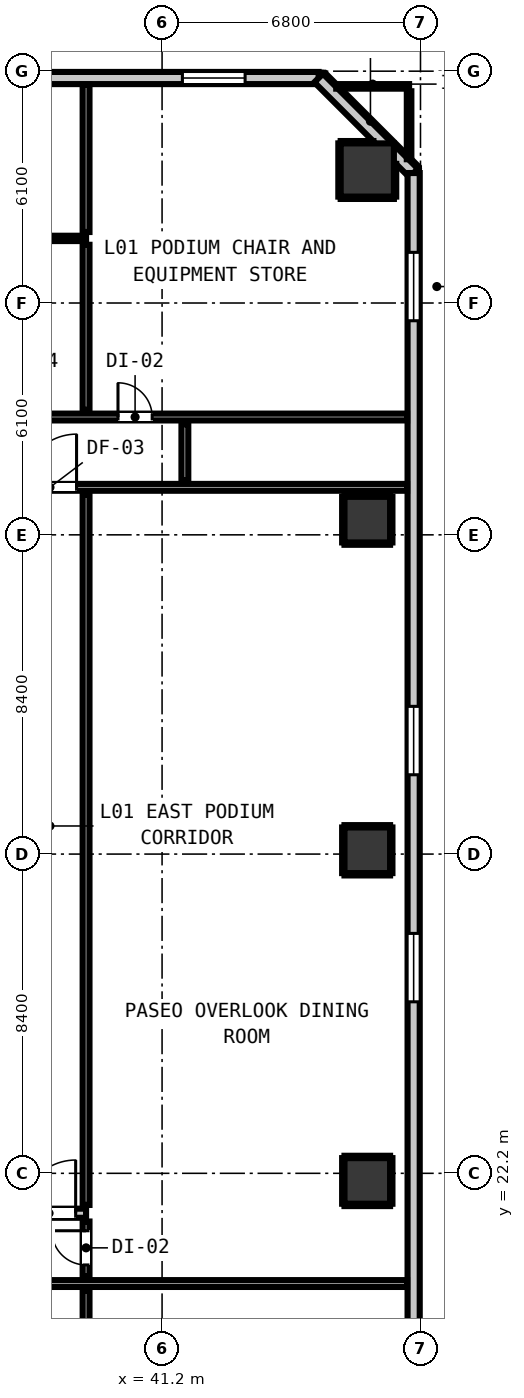
"""IFC4 building model, lengths in metres.
Left out: names, types, materials, properties, quantities, classifications, styles, units other than length and angle.
Written with IfcOpenShell. Run it as: python <this file> out.ifc"""

import sys

from ifc_helpers import new_model, si_unit, direction, frame, frame_2d, origin, origin_2d, place, context, subcontext, project, spatial, rectangle, circle, extrude, element, fill, save


model = new_model("IFC4")
c1 = context("Model", 3, precision=1e-05, world=origin(), true_north=direction((0.0, 1.0)))
c2 = subcontext(c1, "Body", "Model", "MODEL_VIEW")
j1 = project(units=[si_unit("LENGTHUNIT", "METRE"), si_unit("PLANEANGLEUNIT", "RADIAN")], contexts=[c1])
p1 = place(None, origin())
s1 = spatial("IfcSite", under=j1, at=p1, CompositionType="ELEMENT")
p2 = place(p1, origin())
s2 = spatial("IfcBuilding", under=s1, at=p2, CompositionType="ELEMENT")
p3 = place(p2, frame((0.0, 0.0, 5.2)))
s3 = spatial("IfcBuildingStorey", under=s2, at=p3, CompositionType="ELEMENT", Elevation=5.2)
for number, where, z_axis, x_axis in (
    (1, (46.6, 22.0, 0.0), (0.0, 0.0, 1.0), (1.0, 0.0, 0.0)),
    (2, (46.6, 30.7, 0.0), (0.0, 0.0, 1.0), (1.0, 0.0, 0.0)),
    (3, (46.6, 39.4, 0.0), (0.0, 0.0, 1.0), (1.0, 0.0, 0.0)),
):
    element("IfcColumn", number, at=place(p3, frame(where, z_axis=z_axis, x_axis=x_axis)), inside=s3, PredefinedType="COLUMN", context=c2, shape_type="SweptSolid", body=[
        extrude(circle(Radius=0.6, at=origin_2d()), origin(), (0.0, 0.0, 1.0), 4.2),
    ])
p4 = place(p3, frame((46.6, 48.6, 0.0), z_axis=(0.0, 0.0, 1.0), x_axis=(1.0, 0.0, 0.0)))
e4 = element("IfcColumn", 4, at=p4, inside=s3, PredefinedType="COLUMN", context=c2, shape_type="SweptSolid", body=[
    extrude(rectangle(XDim=1.4, YDim=1.4, at=origin_2d()), origin(), (0.0, 0.0, 1.0), 4.2),
])
p5 = place(p3, frame((6.68, 51.02, 0.0), z_axis=(0.0, 0.0, 1.0), x_axis=(1.0, 0.0, 0.0)))
e5 = element("IfcWall", 5, at=p5, inside=s3, PredefinedType="STANDARD", context=c2, shape_type="SweptSolid", body=[
    extrude(rectangle(XDim=38.64, YDim=0.32, at=frame_2d((19.32, 0.0))), origin(), (0.0, 0.0, 1.0), 3.92),
])
p6 = place(p5, frame((18.495, 0.0, 0.9)))
e6 = element("IfcOpeningElement", 6, at=p6, cuts=e5, PredefinedType="OPENING", context=c2, shape_type="SweptSolid", body=[
    extrude(rectangle(XDim=1.65, YDim=1.75, at=frame_2d((0.825, 0.875))), frame((0.0, 0.17, 0.0), z_axis=(0.0, -1.0, 0.0), x_axis=(1.0, 0.0, 0.0)), (0.0, 0.0, 1.0), 0.34),
])
p7 = place(p5, frame((24.015, 0.0, 0.9)))
e7 = element("IfcOpeningElement", 7, at=p7, cuts=e5, PredefinedType="OPENING", context=c2, shape_type="SweptSolid", body=[
    extrude(rectangle(XDim=1.65, YDim=1.75, at=frame_2d((0.825, 0.875))), frame((0.0, 0.17, 0.0), z_axis=(0.0, -1.0, 0.0), x_axis=(1.0, 0.0, 0.0)), (0.0, 0.0, 1.0), 0.34),
])
p8 = place(p5, frame((35.055, 0.0, 0.9)))
e8 = element("IfcOpeningElement", 8, at=p8, cuts=e5, PredefinedType="OPENING", context=c2, shape_type="SweptSolid", body=[
    extrude(rectangle(XDim=1.65, YDim=1.75, at=frame_2d((0.825, 0.875))), frame((0.0, 0.17, 0.0), z_axis=(0.0, -1.0, 0.0), x_axis=(1.0, 0.0, 0.0)), (0.0, 0.0, 1.0), 0.34),
])
p9 = place(p3, frame((45.32, 51.02, 0.0), z_axis=(0.0, 0.0, 1.0), x_axis=(0.707106781187, -0.707106781187, 0.0)))
e9 = element("IfcWall", 9, at=p9, inside=s3, PredefinedType="STANDARD", context=c2, shape_type="SweptSolid", body=[
    extrude(rectangle(XDim=3.536, YDim=0.32, at=frame_2d((1.768, 0.0))), origin(), (0.0, 0.0, 1.0), 3.92),
])
p10 = place(p3, frame((47.82, 48.52, 0.0), z_axis=(0.0, 0.0, 1.0), x_axis=(0.0, -1.0, 0.0)))
e10 = element("IfcWall", 10, at=p10, inside=s3, PredefinedType="STANDARD", context=c2, shape_type="SweptSolid", body=[
    extrude(rectangle(XDim=35.84, YDim=0.32, at=frame_2d((17.92, 0.0))), origin(), (0.0, 0.0, 1.0), 3.92),
])
p11 = place(p10, frame((2.087, 0.0, 0.9)))
e11 = element("IfcOpeningElement", 11, at=p11, cuts=e10, PredefinedType="OPENING", context=c2, shape_type="SweptSolid", body=[
    extrude(rectangle(XDim=1.8, YDim=1.9, at=frame_2d((0.9, 0.95))), frame((0.0, 0.17, 0.0), z_axis=(0.0, -1.0, 0.0), x_axis=(1.0, 0.0, 0.0)), (0.0, 0.0, 1.0), 0.34),
])
p12 = place(p10, frame((14.033, 0.0, 0.9)))
e12 = element("IfcOpeningElement", 12, at=p12, cuts=e10, PredefinedType="OPENING", context=c2, shape_type="SweptSolid", body=[
    extrude(rectangle(XDim=1.8, YDim=1.9, at=frame_2d((0.9, 0.95))), frame((0.0, 0.17, 0.0), z_axis=(0.0, -1.0, 0.0), x_axis=(1.0, 0.0, 0.0)), (0.0, 0.0, 1.0), 0.34),
])
p13 = place(p10, frame((20.007, 0.0, 0.9)))
e13 = element("IfcOpeningElement", 13, at=p13, cuts=e10, PredefinedType="OPENING", context=c2, shape_type="SweptSolid", body=[
    extrude(rectangle(XDim=1.8, YDim=1.9, at=frame_2d((0.9, 0.95))), frame((0.0, 0.17, 0.0), z_axis=(0.0, -1.0, 0.0), x_axis=(1.0, 0.0, 0.0)), (0.0, 0.0, 1.0), 0.34),
])
p14 = place(p10, frame((31.953, 0.0, 0.9)))
e14 = element("IfcOpeningElement", 14, at=p14, cuts=e10, PredefinedType="OPENING", context=c2, shape_type="SweptSolid", body=[
    extrude(rectangle(XDim=1.8, YDim=1.9, at=frame_2d((0.9, 0.95))), frame((0.0, 0.17, 0.0), z_axis=(0.0, -1.0, 0.0), x_axis=(1.0, 0.0, 0.0)), (0.0, 0.0, 1.0), 0.34),
])
p15 = place(p3, frame((10.5, 21.15, 0.0), z_axis=(0.0, 0.0, 1.0), x_axis=(1.0, 0.0, 0.0)))
e15 = element("IfcWall", 15, at=p15, inside=s3, PredefinedType="PARTITIONING", context=c2, shape_type="SweptSolid", body=[
    extrude(rectangle(XDim=28.7, YDim=0.24, at=frame_2d((14.35, 0.0))), origin(), (0.0, 0.0, 1.0), 3.92),
])
p16 = place(p15, frame((7.71, 0.0, 0.0)))
e16 = element("IfcOpeningElement", 16, at=p16, cuts=e15, PredefinedType="OPENING", context=c2, shape_type="SweptSolid", body=[
    extrude(rectangle(XDim=1.1, YDim=2.15, at=frame_2d((0.55, 1.075))), frame((0.0, 0.13, 0.0), z_axis=(0.0, -1.0, 0.0), x_axis=(1.0, 0.0, 0.0)), (0.0, 0.0, 1.0), 0.26),
])
p17 = place(p15, frame((0.324, 0.0, 0.0)))
e17 = element("IfcOpeningElement", 17, at=p17, cuts=e15, PredefinedType="OPENING", context=c2, shape_type="SweptSolid", body=[
    extrude(rectangle(XDim=1.4, YDim=2.15, at=frame_2d((0.7, 1.075))), frame((0.0, 0.13, 0.0), z_axis=(0.0, -1.0, 0.0), x_axis=(1.0, 0.0, 0.0)), (0.0, 0.0, 1.0), 0.26),
])
p18 = place(p15, frame((27.026, 0.0, 0.0)))
e18 = element("IfcOpeningElement", 18, at=p18, cuts=e15, PredefinedType="OPENING", context=c2, shape_type="SweptSolid", body=[
    extrude(rectangle(XDim=1.4, YDim=2.15, at=frame_2d((0.7, 1.075))), frame((0.0, 0.13, 0.0), z_axis=(0.0, -1.0, 0.0), x_axis=(1.0, 0.0, 0.0)), (0.0, 0.0, 1.0), 0.26),
])
p19 = place(p3, frame((4.352, 19.3, 0.0), z_axis=(0.0, 0.0, 1.0), x_axis=(1.0, 0.0, 0.0)))
e19 = element("IfcWall", 19, at=p19, inside=s3, PredefinedType="PARTITIONING", context=c2, shape_type="SweptSolid", body=[
    extrude(rectangle(XDim=43.296, YDim=0.18, at=frame_2d((21.648, 0.0))), origin(), (0.0, 0.0, 1.0), 3.92),
])
p20 = place(p19, frame((12.248, 0.0, 0.0)))
e20 = element("IfcOpeningElement", 20, at=p20, cuts=e19, PredefinedType="OPENING", context=c2, shape_type="SweptSolid", body=[
    extrude(rectangle(XDim=1.0, YDim=2.15, at=frame_2d((0.5, 1.075))), frame((0.0, 0.1, 0.0), z_axis=(0.0, -1.0, 0.0), x_axis=(1.0, 0.0, 0.0)), (0.0, 0.0, 1.0), 0.2),
])
p21 = place(p19, frame((27.998, 0.0, 0.0)))
e21 = element("IfcOpeningElement", 21, at=p21, cuts=e19, PredefinedType="OPENING", context=c2, shape_type="SweptSolid", body=[
    extrude(rectangle(XDim=1.0, YDim=2.15, at=frame_2d((0.5, 1.075))), frame((0.0, 0.1, 0.0), z_axis=(0.0, -1.0, 0.0), x_axis=(1.0, 0.0, 0.0)), (0.0, 0.0, 1.0), 0.2),
])
p22 = place(p3, frame((10.5, 40.25, 0.0), z_axis=(0.0, 0.0, 1.0), x_axis=(1.0, 0.0, 0.0)))
e22 = element("IfcWall", 22, at=p22, inside=s3, PredefinedType="PARTITIONING", context=c2, shape_type="SweptSolid", body=[
    extrude(rectangle(XDim=37.148, YDim=0.18, at=frame_2d((18.574, 0.0))), origin(), (0.0, 0.0, 1.0), 3.92),
])
p23 = place(p22, frame((6.935, 0.0, 0.0)))
e23 = element("IfcOpeningElement", 23, at=p23, cuts=e22, PredefinedType="OPENING", context=c2, shape_type="SweptSolid", body=[
    extrude(rectangle(XDim=1.4, YDim=2.15, at=frame_2d((0.7, 1.075))), frame((0.0, 0.1, 0.0), z_axis=(0.0, -1.0, 0.0), x_axis=(1.0, 0.0, 0.0)), (0.0, 0.0, 1.0), 0.2),
])
p24 = place(p22, frame((0.324, 0.0, 0.0)))
e24 = element("IfcOpeningElement", 24, at=p24, cuts=e22, PredefinedType="OPENING", context=c2, shape_type="SweptSolid", body=[
    extrude(rectangle(XDim=1.4, YDim=2.15, at=frame_2d((0.7, 1.075))), frame((0.0, 0.1, 0.0), z_axis=(0.0, -1.0, 0.0), x_axis=(1.0, 0.0, 0.0)), (0.0, 0.0, 1.0), 0.2),
])
p25 = place(p22, frame((27.05, 0.0, 0.0)))
e25 = element("IfcOpeningElement", 25, at=p25, cuts=e22, PredefinedType="OPENING", context=c2, shape_type="SweptSolid", body=[
    extrude(rectangle(XDim=1.4, YDim=2.15, at=frame_2d((0.7, 1.075))), frame((0.0, 0.1, 0.0), z_axis=(0.0, -1.0, 0.0), x_axis=(1.0, 0.0, 0.0)), (0.0, 0.0, 1.0), 0.2),
])
p26 = place(p3, frame((4.352, 42.1, 0.0), z_axis=(0.0, 0.0, 1.0), x_axis=(1.0, 0.0, 0.0)))
e26 = element("IfcWall", 26, at=p26, inside=s3, PredefinedType="PARTITIONING", context=c2, shape_type="SweptSolid", body=[
    extrude(rectangle(XDim=43.296, YDim=0.18, at=frame_2d((21.648, 0.0))), origin(), (0.0, 0.0, 1.0), 3.92),
])
p27 = place(p26, frame((10.072, 0.0, 0.0)))
e27 = element("IfcOpeningElement", 27, at=p27, cuts=e26, PredefinedType="OPENING", context=c2, shape_type="SweptSolid", body=[
    extrude(rectangle(XDim=0.9, YDim=2.1, at=frame_2d((0.45, 1.05))), frame((0.0, 0.1, 0.0), z_axis=(0.0, -1.0, 0.0), x_axis=(1.0, 0.0, 0.0)), (0.0, 0.0, 1.0), 0.2),
])
p28 = place(p26, frame((18.798, 0.0, 0.0)))
e28 = element("IfcOpeningElement", 28, at=p28, cuts=e26, PredefinedType="OPENING", context=c2, shape_type="SweptSolid", body=[
    extrude(rectangle(XDim=0.9, YDim=2.1, at=frame_2d((0.45, 1.05))), frame((0.0, 0.1, 0.0), z_axis=(0.0, -1.0, 0.0), x_axis=(1.0, 0.0, 0.0)), (0.0, 0.0, 1.0), 0.2),
])
p29 = place(p26, frame((25.118, 0.0, 0.0)))
e29 = element("IfcOpeningElement", 29, at=p29, cuts=e26, PredefinedType="OPENING", context=c2, shape_type="SweptSolid", body=[
    extrude(rectangle(XDim=0.86, YDim=2.02, at=frame_2d((0.43, 1.01))), frame((0.0, 0.1, 0.0), z_axis=(0.0, -1.0, 0.0), x_axis=(1.0, 0.0, 0.0)), (0.0, 0.0, 1.0), 0.2),
])
p30 = place(p26, frame((29.218, 0.0, 0.0)))
e30 = element("IfcOpeningElement", 30, at=p30, cuts=e26, PredefinedType="OPENING", context=c2, shape_type="SweptSolid", body=[
    extrude(rectangle(XDim=0.86, YDim=2.02, at=frame_2d((0.43, 1.01))), frame((0.0, 0.1, 0.0), z_axis=(0.0, -1.0, 0.0), x_axis=(1.0, 0.0, 0.0)), (0.0, 0.0, 1.0), 0.2),
])
p31 = place(p26, frame((32.873, 0.0, 0.0)))
e31 = element("IfcOpeningElement", 31, at=p31, cuts=e26, PredefinedType="OPENING", context=c2, shape_type="SweptSolid", body=[
    extrude(rectangle(XDim=0.95, YDim=2.1, at=frame_2d((0.475, 1.05))), frame((0.0, 0.1, 0.0), z_axis=(0.0, -1.0, 0.0), x_axis=(1.0, 0.0, 0.0)), (0.0, 0.0, 1.0), 0.2),
])
p32 = place(p26, frame((35.688, 0.0, 0.0)))
e32 = element("IfcOpeningElement", 32, at=p32, cuts=e26, PredefinedType="OPENING", context=c2, shape_type="SweptSolid", body=[
    extrude(rectangle(XDim=0.9, YDim=2.1, at=frame_2d((0.45, 1.05))), frame((0.0, 0.1, 0.0), z_axis=(0.0, -1.0, 0.0), x_axis=(1.0, 0.0, 0.0)), (0.0, 0.0, 1.0), 0.2),
])
p33 = place(p3, frame((28.0, 46.8, 0.0), z_axis=(0.0, 0.0, 1.0), x_axis=(1.0, 0.0, 0.0)))
e33 = element("IfcWall", 33, at=p33, inside=s3, PredefinedType="PARTITIONING", context=c2, shape_type="SweptSolid", body=[
    extrude(rectangle(XDim=11.2, YDim=0.14, at=frame_2d((5.6, 0.0))), origin(), (0.0, 0.0, 1.0), 3.92),
])
p34 = place(p3, frame((45.783, 50.8, 0.0), z_axis=(0.0, 0.0, 1.0), x_axis=(1.0, 0.0, 0.0)))
e34 = element("IfcWall", 34, at=p34, inside=s3, PredefinedType="PARTITIONING", context=c2, shape_type="SweptSolid", body=[
    extrude(rectangle(XDim=1.917, YDim=0.12, at=frame_2d((0.958, 0.0))), origin(), (0.0, 0.0, 1.0), 3.92),
])
p35 = place(p3, frame((39.2, 12.258, 0.0), z_axis=(0.0, 0.0, 1.0), x_axis=(0.0, 1.0, 0.0)))
e35 = element("IfcWall", 35, at=p35, inside=s3, PredefinedType="PARTITIONING", context=c2, shape_type="SweptSolid", body=[
    extrude(rectangle(XDim=6.854, YDim=0.18, at=frame_2d((3.427, 0.0))), origin(), (0.0, 0.0, 1.0), 3.92),
])
p36 = place(p3, frame((39.2, 19.488, 0.0), z_axis=(0.0, 0.0, 1.0), x_axis=(0.0, 1.0, 0.0)))
e36 = element("IfcWall", 36, at=p36, inside=s3, PredefinedType="PARTITIONING", context=c2, shape_type="SweptSolid", body=[
    extrude(rectangle(XDim=1.444, YDim=0.18, at=frame_2d((0.722, 0.0))), origin(), (0.0, 0.0, 1.0), 3.92),
])
p37 = place(p36, frame((0.301, 0.0, 0.0)))
e37 = element("IfcOpeningElement", 37, at=p37, cuts=e36, PredefinedType="OPENING", context=c2, shape_type="SweptSolid", body=[
    extrude(rectangle(XDim=0.9, YDim=2.1, at=frame_2d((0.45, 1.05))), frame((0.0, 0.1, 0.0), z_axis=(0.0, -1.0, 0.0), x_axis=(1.0, 0.0, 0.0)), (0.0, 0.0, 1.0), 0.2),
])
p38 = place(p3, frame((39.2, 21.368, 0.0), z_axis=(0.0, 0.0, 1.0), x_axis=(0.0, 1.0, 0.0)))
e38 = element("IfcWall", 38, at=p38, inside=s3, PredefinedType="PARTITIONING", context=c2, shape_type="SweptSolid", body=[
    extrude(rectangle(XDim=18.694, YDim=0.18, at=frame_2d((9.347, 0.0))), origin(), (0.0, 0.0, 1.0), 3.92),
])
p39 = place(p3, frame((39.2, 42.288, 0.0), z_axis=(0.0, 0.0, 1.0), x_axis=(0.0, 1.0, 0.0)))
e39 = element("IfcWall", 39, at=p39, inside=s3, PredefinedType="PARTITIONING", context=c2, shape_type="SweptSolid", body=[
    extrude(rectangle(XDim=4.344, YDim=0.18, at=frame_2d((2.172, 0.0))), origin(), (0.0, 0.0, 1.0), 3.92),
])
p40 = place(p3, frame((39.2, 46.968, 0.0), z_axis=(0.0, 0.0, 1.0), x_axis=(0.0, 1.0, 0.0)))
e40 = element("IfcWall", 40, at=p40, inside=s3, PredefinedType="PARTITIONING", context=c2, shape_type="SweptSolid", body=[
    extrude(rectangle(XDim=3.88, YDim=0.18, at=frame_2d((1.94, 0.0))), origin(), (0.0, 0.0, 1.0), 3.92),
])
p41 = place(p3, frame((41.8, 40.438, 0.0), z_axis=(0.0, 0.0, 1.0), x_axis=(0.0, 1.0, 0.0)))
e41 = element("IfcWall", 41, at=p41, inside=s3, PredefinedType="PARTITIONING", context=c2, shape_type="SweptSolid", body=[
    extrude(rectangle(XDim=1.474, YDim=0.18, at=frame_2d((0.737, 0.0))), origin(), (0.0, 0.0, 1.0), 3.92),
])
p42 = place(p3, frame((47.7, 48.883, 0.0), z_axis=(0.0, 0.0, 1.0), x_axis=(0.0, 1.0, 0.0)))
e42 = element("IfcWall", 42, at=p42, inside=s3, PredefinedType="PARTITIONING", context=c2, shape_type="SweptSolid", body=[
    extrude(rectangle(XDim=1.789, YDim=0.12, at=frame_2d((0.895, 0.0))), origin(), (0.0, 0.0, 1.0), 3.92),
])
for number, where, z_axis, x_axis in (
    (43, (46.0, 21.368, 0.0), (0.0, 0.0, 1.0), (1.0, 0.0, 0.0)),
    (44, (46.0, 22.632, 0.0), (0.0, 0.0, 1.0), (1.0, 0.0, 0.0)),
):
    element("IfcWall", number, at=place(p3, frame(where, z_axis=z_axis, x_axis=x_axis)), inside=s3, PredefinedType="PARTITIONING", context=c2, shape_type="SweptSolid", body=[
        extrude(rectangle(XDim=1.2, YDim=0.06, at=frame_2d((0.6, 0.0))), origin(), (0.0, 0.0, 1.0), 1.45),
    ])
for number, where, z_axis, x_axis in (
    (45, (45.968, 21.4, 0.0), (0.0, 0.0, 1.0), (0.0, 1.0, 0.0)),
    (46, (47.232, 21.4, 0.0), (0.0, 0.0, 1.0), (0.0, 1.0, 0.0)),
):
    element("IfcWall", number, at=place(p3, frame(where, z_axis=z_axis, x_axis=x_axis)), inside=s3, PredefinedType="PARTITIONING", context=c2, shape_type="SweptSolid", body=[
        extrude(rectangle(XDim=1.2, YDim=0.06, at=frame_2d((0.6, 0.0))), origin(), (0.0, 0.0, 1.0), 1.45),
    ])
for number, where, z_axis, x_axis in (
    (47, (46.0, 30.068, 0.0), (0.0, 0.0, 1.0), (1.0, 0.0, 0.0)),
    (48, (46.0, 31.332, 0.0), (0.0, 0.0, 1.0), (1.0, 0.0, 0.0)),
    (49, (45.968, 30.1, 0.0), (0.0, 0.0, 1.0), (0.0, 1.0, 0.0)),
    (50, (47.232, 30.1, 0.0), (0.0, 0.0, 1.0), (0.0, 1.0, 0.0)),
    (51, (46.0, 38.768, 0.0), (0.0, 0.0, 1.0), (1.0, 0.0, 0.0)),
    (52, (46.0, 40.032, 0.0), (0.0, 0.0, 1.0), (1.0, 0.0, 0.0)),
    (53, (45.968, 38.8, 0.0), (0.0, 0.0, 1.0), (0.0, 1.0, 0.0)),
    (54, (47.232, 38.8, 0.0), (0.0, 0.0, 1.0), (0.0, 1.0, 0.0)),
):
    element("IfcWall", number, at=place(p3, frame(where, z_axis=z_axis, x_axis=x_axis)), inside=s3, PredefinedType="PARTITIONING", context=c2, shape_type="SweptSolid", body=[
        extrude(rectangle(XDim=1.2, YDim=0.06, at=frame_2d((0.6, 0.0))), origin(), (0.0, 0.0, 1.0), 1.45),
    ])
p43 = place(p3, frame((45.9, 47.868, 0.0), z_axis=(0.0, 0.0, 1.0), x_axis=(1.0, 0.0, 0.0)))
e55 = element("IfcWall", 55, at=p43, inside=s3, PredefinedType="PARTITIONING", context=c2, shape_type="SweptSolid", body=[
    extrude(rectangle(XDim=1.4, YDim=0.06, at=frame_2d((0.7, 0.0))), origin(), (0.0, 0.0, 1.0), 1.45),
])
p44 = place(p3, frame((45.9, 49.332, 0.0), z_axis=(0.0, 0.0, 1.0), x_axis=(1.0, 0.0, 0.0)))
e56 = element("IfcWall", 56, at=p44, inside=s3, PredefinedType="PARTITIONING", context=c2, shape_type="SweptSolid", body=[
    extrude(rectangle(XDim=0.861, YDim=0.06, at=frame_2d((0.431, 0.0))), origin(), (0.0, 0.0, 1.0), 1.45),
])
p45 = place(p3, frame((45.868, 47.9, 0.0), z_axis=(0.0, 0.0, 1.0), x_axis=(0.0, 1.0, 0.0)))
e57 = element("IfcWall", 57, at=p45, inside=s3, PredefinedType="PARTITIONING", context=c2, shape_type="SweptSolid", body=[
    extrude(rectangle(XDim=1.4, YDim=0.06, at=frame_2d((0.7, 0.0))), origin(), (0.0, 0.0, 1.0), 1.45),
])
p46 = place(p3, frame((47.332, 47.9, 0.0), z_axis=(0.0, 0.0, 1.0), x_axis=(0.0, 1.0, 0.0)))
e58 = element("IfcWall", 58, at=p46, inside=s3, PredefinedType="PARTITIONING", context=c2, shape_type="SweptSolid", body=[
    extrude(rectangle(XDim=0.861, YDim=0.06, at=frame_2d((0.431, 0.0))), origin(), (0.0, 0.0, 1.0), 1.45),
])
p47 = place(p8, origin())
e59 = element("IfcWindow", 59, at=p47, inside=s3, PartitioningType="SINGLE_PANEL", PredefinedType="WINDOW", context=c2, shape_type="SweptSolid", body=[
    extrude(rectangle(XDim=1.65, YDim=1.75, at=frame_2d((0.825, 0.875))), frame((0.0, 0.03, 0.0), z_axis=(0.0, -1.0, 0.0), x_axis=(1.0, 0.0, 0.0)), (0.0, 0.0, 1.0), 0.06),
])
fill(e8, e59)
p48 = place(p11, origin())
e60 = element("IfcWindow", 60, at=p48, inside=s3, PartitioningType="SINGLE_PANEL", PredefinedType="WINDOW", context=c2, shape_type="SweptSolid", body=[
    extrude(rectangle(XDim=1.8, YDim=1.9, at=frame_2d((0.9, 0.95))), frame((0.0, 0.03, 0.0), z_axis=(0.0, -1.0, 0.0), x_axis=(1.0, 0.0, 0.0)), (0.0, 0.0, 1.0), 0.06),
])
fill(e11, e60)
p49 = place(p12, origin())
e61 = element("IfcWindow", 61, at=p49, inside=s3, PartitioningType="SINGLE_PANEL", PredefinedType="WINDOW", context=c2, shape_type="SweptSolid", body=[
    extrude(rectangle(XDim=1.8, YDim=1.9, at=frame_2d((0.9, 0.95))), frame((0.0, 0.03, 0.0), z_axis=(0.0, -1.0, 0.0), x_axis=(1.0, 0.0, 0.0)), (0.0, 0.0, 1.0), 0.06),
])
fill(e12, e61)
p50 = place(p13, origin())
e62 = element("IfcWindow", 62, at=p50, inside=s3, PartitioningType="SINGLE_PANEL", PredefinedType="WINDOW", context=c2, shape_type="SweptSolid", body=[
    extrude(rectangle(XDim=1.8, YDim=1.9, at=frame_2d((0.9, 0.95))), frame((0.0, 0.03, 0.0), z_axis=(0.0, -1.0, 0.0), x_axis=(1.0, 0.0, 0.0)), (0.0, 0.0, 1.0), 0.06),
])
fill(e13, e62)
p51 = place(p18, origin())
e63 = element("IfcDoor", 63, at=p51, inside=s3, OperationType="SINGLE_SWING_RIGHT", PredefinedType="DOOR", context=c2, shape_type="SweptSolid", body=[
    extrude(rectangle(XDim=1.4, YDim=2.15, at=frame_2d((0.7, 1.075))), frame((0.0, 0.025, 0.0), z_axis=(0.0, -1.0, 0.0), x_axis=(1.0, 0.0, 0.0)), (0.0, 0.0, 1.0), 0.05),
])
fill(e18, e63)
p52 = place(p25, origin())
e64 = element("IfcDoor", 64, at=p52, inside=s3, OperationType="SINGLE_SWING_RIGHT", PredefinedType="DOOR", context=c2, shape_type="SweptSolid", body=[
    extrude(rectangle(XDim=1.4, YDim=2.15, at=frame_2d((0.7, 1.075))), frame((0.0, 0.025, 0.0), z_axis=(0.0, -1.0, 0.0), x_axis=(1.0, 0.0, 0.0)), (0.0, 0.0, 1.0), 0.05),
])
fill(e25, e64)
p53 = place(p37, origin())
e65 = element("IfcDoor", 65, at=p53, inside=s3, OperationType="SINGLE_SWING_RIGHT", PredefinedType="DOOR", context=c2, shape_type="SweptSolid", body=[
    extrude(rectangle(XDim=0.9, YDim=2.1, at=frame_2d((0.45, 1.05))), frame((0.0, 0.025, 0.0), z_axis=(0.0, -1.0, 0.0), x_axis=(1.0, 0.0, 0.0)), (0.0, 0.0, 1.0), 0.05),
])
fill(e37, e65)
p54 = place(p32, origin())
e66 = element("IfcDoor", 66, at=p54, inside=s3, OperationType="SINGLE_SWING_LEFT", PredefinedType="DOOR", context=c2, shape_type="SweptSolid", body=[
    extrude(rectangle(XDim=0.9, YDim=2.1, at=frame_2d((0.45, 1.05))), frame((0.0, 0.025, 0.0), z_axis=(0.0, -1.0, 0.0), x_axis=(1.0, 0.0, 0.0)), (0.0, 0.0, 1.0), 0.05),
])
fill(e32, e66)
save(model, sys.argv[1])
